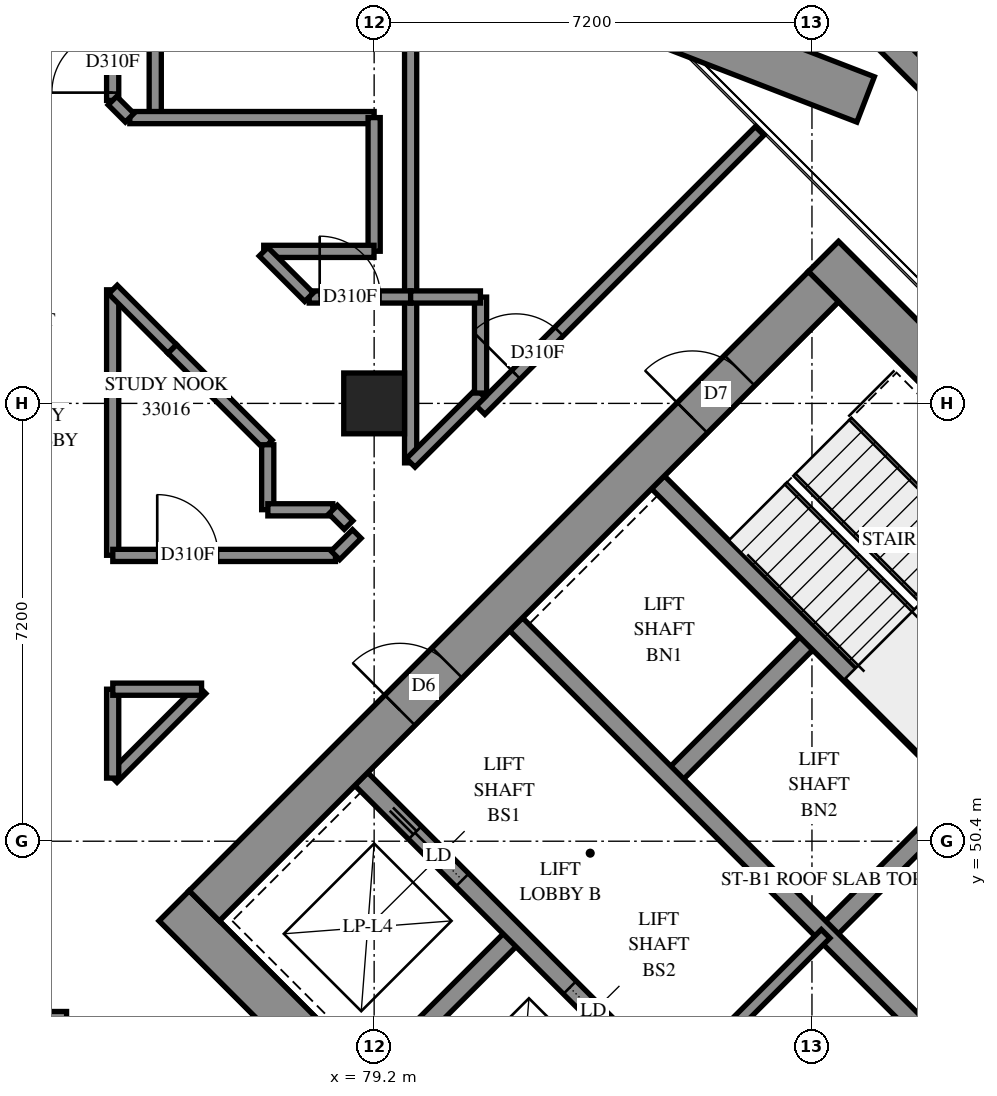
"""IFC4 building model, lengths in metres.
Left out: names, types, materials, properties, quantities, classifications, styles, units other than length and angle.
Written with IfcOpenShell. Run it as: python <this file> out.ifc"""

import sys

from ifc_helpers import new_model, si_unit, direction, frame, frame_2d, origin, origin_2d, place, context, subcontext, project, spatial, polyline, rectangle, outline, extrude, element, fill, save


model = new_model("IFC4")
c1 = context("Model", 3, precision=1e-05, world=origin(), true_north=direction((0.0, 1.0)))
c2 = subcontext(c1, "Body", "Model", "MODEL_VIEW")
j1 = project(units=[si_unit("LENGTHUNIT", "METRE"), si_unit("PLANEANGLEUNIT", "RADIAN")], contexts=[c1])
p1 = place(None, origin())
s1 = spatial("IfcSite", under=j1, at=p1, CompositionType="ELEMENT")
p2 = place(p1, origin())
s2 = spatial("IfcBuilding", under=s1, at=p2, CompositionType="ELEMENT")
p3 = place(p2, frame((0.0, 0.0, 122.0)))
s3 = spatial("IfcBuildingStorey", under=s2, at=p3, CompositionType="ELEMENT", Elevation=122.0)
p4 = place(p3, frame((79.2, 57.6, 0.0), z_axis=(0.0, 0.0, 1.0), x_axis=(1.0, 0.0, 0.0)))
e1 = element("IfcColumn", 1, at=p4, inside=s3, PredefinedType="COLUMN", context=c2, shape_type="SweptSolid", body=[
    extrude(rectangle(XDim=1.0, YDim=1.0, at=origin_2d()), origin(), (0.0, 0.0, 1.0), 3.9),
])
p5 = place(p3, frame((75.912, 49.337, -0.3), z_axis=(0.0, 0.0, 1.0), x_axis=(0.7071036166, -0.7071099457, 0.0)))
e2 = element("IfcWall", 2, at=p5, inside=s3, PredefinedType="SHEAR", context=c2, shape_type="SweptSolid", body=[
    extrude(rectangle(XDim=15.8, YDim=0.7, at=frame_2d((7.9, 0.0))), origin(), (0.0, 0.0, 1.0), 3.5),
])
p6 = place(p3, frame((86.589, 60.014, -0.3), z_axis=(0.0, 0.0, 1.0), x_axis=(0.7071099457, -0.7071036166, 0.0)))
e3 = element("IfcWall", 3, at=p6, inside=s3, PredefinedType="SHEAR", context=c2, shape_type="SweptSolid", body=[
    extrude(rectangle(XDim=15.8, YDim=0.7, at=frame_2d((7.9, 0.0))), origin(), (0.0, 0.0, 1.0), 3.5),
])
p7 = place(p6, frame((10.7, 0.0, 0.3)))
e4 = element("IfcOpeningElement", 4, at=p7, cuts=e3, PredefinedType="OPENING", context=c2, shape_type="SweptSolid", body=[
    extrude(rectangle(XDim=0.8, YDim=2.1, at=frame_2d((0.4, 1.05))), frame((0.0, 0.36, 0.0), z_axis=(0.0, -1.0, 0.0), x_axis=(1.0, 0.0, 0.0)), (0.0, 0.0, 1.0), 0.72),
])
p8 = place(p3, frame((76.407, 49.337, -0.3), z_axis=(0.0, 0.0, 1.0), x_axis=(0.7071067812, 0.7071067812, 0.0)))
e5 = element("IfcWall", 5, at=p8, inside=s3, PredefinedType="SHEAR", context=c2, shape_type="SweptSolid", body=[
    extrude(rectangle(XDim=14.4, YDim=0.7, at=frame_2d((7.2, 0.0))), origin(), (0.0, 0.0, 1.0), 3.5),
])
p9 = place(p8, frame((4.55, 0.0, 0.3)))
e6 = element("IfcOpeningElement", 6, at=p9, cuts=e5, PredefinedType="OPENING", context=c2, shape_type="SweptSolid", body=[
    extrude(rectangle(XDim=1.1, YDim=2.1, at=frame_2d((0.55, 1.05))), frame((0.0, 0.36, 0.0), z_axis=(0.0, -1.0, 0.0), x_axis=(1.0, 0.0, 0.0)), (0.0, 0.0, 1.0), 0.72),
])
p10 = place(p8, frame((11.35, 0.0, 0.3)))
e7 = element("IfcOpeningElement", 7, at=p10, cuts=e5, PredefinedType="OPENING", context=c2, shape_type="SweptSolid", body=[
    extrude(rectangle(XDim=1.1, YDim=2.1, at=frame_2d((0.55, 1.05))), frame((0.0, 0.36, 0.0), z_axis=(0.0, -1.0, 0.0), x_axis=(1.0, 0.0, 0.0)), (0.0, 0.0, 1.0), 0.72),
])
p11 = place(p3, frame((87.084, 38.66, -0.3), z_axis=(0.0, 0.0, 1.0), x_axis=(0.7071067812, 0.7071067812, 0.0)))
e8 = element("IfcWall", 8, at=p11, inside=s3, PredefinedType="SHEAR", context=c2, shape_type="SweptSolid", body=[
    extrude(rectangle(XDim=14.4, YDim=0.7, at=frame_2d((7.2, 0.0))), origin(), (0.0, 0.0, 1.0), 3.5),
])
p12 = place(p11, frame((4.55, 0.0, 0.3)))
e9 = element("IfcOpeningElement", 9, at=p12, cuts=e8, PredefinedType="OPENING", context=c2, shape_type="SweptSolid", body=[
    extrude(rectangle(XDim=1.1, YDim=2.1, at=frame_2d((0.55, 1.05))), frame((0.0, 0.36, 0.0), z_axis=(0.0, -1.0, 0.0), x_axis=(1.0, 0.0, 0.0)), (0.0, 0.0, 1.0), 0.72),
])
p13 = place(p11, frame((11.35, 0.0, 0.3)))
e10 = element("IfcOpeningElement", 10, at=p13, cuts=e8, PredefinedType="OPENING", context=c2, shape_type="SweptSolid", body=[
    extrude(rectangle(XDim=1.1, YDim=2.1, at=frame_2d((0.55, 1.05))), frame((0.0, 0.36, 0.0), z_axis=(0.0, -1.0, 0.0), x_axis=(1.0, 0.0, 0.0)), (0.0, 0.0, 1.0), 0.72),
])
for number, where, z_axis, x_axis in (
    (11, (79.2, 46.544, 0.0), (0.0, 0.0, 1.0), (0.707, 0.707, 0.0)),
    (12, (84.079, 51.423, 0.0), (0.0, 0.0, 1.0), (0.707, 0.707, 0.0)),
):
    element("IfcWall", number, at=place(p3, frame(where, z_axis=z_axis, x_axis=x_axis)), inside=s3, PredefinedType="SOLIDWALL", context=c2, shape_type="SweptSolid", body=[
        extrude(rectangle(XDim=3.3, YDim=0.3, at=frame_2d((1.65, 0.0))), origin(), (0.0, 0.0, 1.0), 3.9),
    ])
p14 = place(p3, frame((86.625, 48.878, 0.0), z_axis=(0.0, 0.0, 1.0), x_axis=(0.7071067812, 0.7071067812, 0.0)))
e13 = element("IfcWall", 13, at=p14, inside=s3, PredefinedType="SOLIDWALL", context=c2, shape_type="SweptSolid", body=[
    extrude(rectangle(XDim=3.3, YDim=0.3, at=frame_2d((1.65, 0.0))), origin(), (0.0, 0.0, 1.0), 3.9),
])
p15 = place(p3, frame((78.988, 51.423, 0.0), z_axis=(0.0, 0.0, 1.0), x_axis=(0.7071067812, -0.7071067812, 0.0)))
e14 = element("IfcWall", 14, at=p15, inside=s3, PredefinedType="SOLIDWALL", context=c2, shape_type="SweptSolid", body=[
    extrude(rectangle(XDim=14.4, YDim=0.3, at=frame_2d((7.2, 0.0))), origin(), (0.0, 0.0, 1.0), 3.9),
])
p16 = place(p15, frame((1.25, 0.0, 0.0)))
e15 = element("IfcOpeningElement", 15, at=p16, cuts=e14, PredefinedType="OPENING", context=c2, shape_type="SweptSolid", body=[
    extrude(rectangle(XDim=1.1, YDim=2.1, at=frame_2d((0.55, 1.05))), frame((0.0, 0.16, 0.0), z_axis=(0.0, -1.0, 0.0), x_axis=(1.0, 0.0, 0.0)), (0.0, 0.0, 1.0), 0.32),
])
p17 = place(p15, frame((4.85, 0.0, 0.0)))
e16 = element("IfcOpeningElement", 16, at=p17, cuts=e14, PredefinedType="OPENING", context=c2, shape_type="SweptSolid", body=[
    extrude(rectangle(XDim=1.1, YDim=2.1, at=frame_2d((0.55, 1.05))), frame((0.0, 0.16, 0.0), z_axis=(0.0, -1.0, 0.0), x_axis=(1.0, 0.0, 0.0)), (0.0, 0.0, 1.0), 0.32),
])
p18 = place(p15, frame((8.45, 0.0, 0.0)))
e17 = element("IfcOpeningElement", 17, at=p18, cuts=e14, PredefinedType="OPENING", context=c2, shape_type="SweptSolid", body=[
    extrude(rectangle(XDim=1.1, YDim=2.1, at=frame_2d((0.55, 1.05))), frame((0.0, 0.16, 0.0), z_axis=(0.0, -1.0, 0.0), x_axis=(1.0, 0.0, 0.0)), (0.0, 0.0, 1.0), 0.32),
])
p19 = place(p15, frame((12.05, 0.0, 0.0)))
e18 = element("IfcOpeningElement", 18, at=p19, cuts=e14, PredefinedType="OPENING", context=c2, shape_type="SweptSolid", body=[
    extrude(rectangle(XDim=1.1, YDim=2.1, at=frame_2d((0.55, 1.05))), frame((0.0, 0.16, 0.0), z_axis=(0.0, -1.0, 0.0), x_axis=(1.0, 0.0, 0.0)), (0.0, 0.0, 1.0), 0.32),
])
p20 = place(p3, frame((81.534, 53.969, 0.0), z_axis=(0.0, 0.0, 1.0), x_axis=(0.707103309, -0.7071102534, 0.0)))
e19 = element("IfcWall", 19, at=p20, inside=s3, PredefinedType="SOLIDWALL", context=c2, shape_type="SweptSolid", body=[
    extrude(rectangle(XDim=14.4, YDim=0.3, at=frame_2d((7.2, 0.0))), origin(), (0.0, 0.0, 1.0), 3.9),
])
p21 = place(p20, frame((12.05, 0.0, 0.0)))
e20 = element("IfcOpeningElement", 20, at=p21, cuts=e19, PredefinedType="OPENING", context=c2, shape_type="SweptSolid", body=[
    extrude(rectangle(XDim=1.1, YDim=2.1, at=frame_2d((0.55, 1.05))), frame((0.0, 0.16, 0.0), z_axis=(0.0, -1.0, 0.0), x_axis=(1.0, 0.0, 0.0)), (0.0, 0.0, 1.0), 0.32),
])
p22 = place(p3, frame((83.867, 56.302, 0.0), z_axis=(0.0, 0.0, 1.0), x_axis=(0.7071137256, -0.7070998367, 0.0)))
e21 = element("IfcWall", 21, at=p22, inside=s3, PredefinedType="SOLIDWALL", context=c2, shape_type="SweptSolid", body=[
    extrude(rectangle(XDim=7.2, YDim=0.3, at=frame_2d((3.6, 0.0))), origin(), (0.0, 0.0, 1.0), 3.9),
])
p23 = place(p3, frame((87.282, 62.599, 0.0), z_axis=(0.0, 0.0, 1.0), x_axis=(-0.9328056398, 0.360379853, 0.0)))
e22 = element("IfcWall", 22, at=p23, inside=s3, PredefinedType="SOLIDWALL", context=c2, shape_type="SweptSolid", body=[
    extrude(rectangle(XDim=6.413, YDim=0.8, at=frame_2d((3.207, 0.0))), origin(), (0.0, 0.0, 1.0), 0.65),
])
p24 = place(p3, frame((107.838, 44.847, 0.0), z_axis=(0.0, 0.0, 1.0), x_axis=(-0.7071067812, 0.7071067812, 0.0)))
e23 = element("IfcWall", 23, at=p24, inside=s3, PredefinedType="SOLIDWALL", context=c2, shape_type="SweptSolid", body=[
    extrude(outline(polyline([(-0.1, -0.1), (39.926, -0.1), (39.843, 0.1), (0.1, 0.1), (-0.1, -0.1)])), origin(), (0.0, 0.0, 1.0), 4.2),
])
p25 = place(p3, frame((84.079, 46.332, 0.0), z_axis=(0.0, 0.0, 1.0), x_axis=(0.7071067812, 0.7071067812, 0.0)))
e24 = element("IfcWall", 24, at=p25, inside=s3, PredefinedType="PARTITIONING", context=c2, shape_type="SweptSolid", body=[
    extrude(rectangle(XDim=3.6, YDim=0.2, at=frame_2d((1.8, 0.0))), origin(), (0.0, 0.0, 1.0), 3.9),
])
p26 = place(p3, frame((54.7, 47.5, 0.0), z_axis=(0.0, 0.0, 1.0), x_axis=(1.0, 0.0, 0.0)))
e25 = element("IfcWall", 25, at=p26, inside=s3, PredefinedType="PARTITIONING", context=c2, shape_type="SweptSolid", body=[
    extrude(rectangle(XDim=19.442, YDim=0.2, at=frame_2d((9.721, 0.0))), origin(), (0.0, 0.0, 1.0), 3.9),
])
p27 = place(p26, frame((12.444, 0.0, 0.0)))
e26 = element("IfcOpeningElement", 26, at=p27, cuts=e25, PredefinedType="OPENING", context=c2, shape_type="SweptSolid", body=[
    extrude(rectangle(XDim=1.0, YDim=2.1, at=frame_2d((0.5, 1.05))), frame((0.0, 0.11, 0.0), z_axis=(0.0, -1.0, 0.0), x_axis=(1.0, 0.0, 0.0)), (0.0, 0.0, 1.0), 0.22),
])
p28 = place(p3, frame((79.8, 59.35, 0.0), z_axis=(0.0, 0.0, 1.0), x_axis=(0.0, 1.0, 0.0)))
e27 = element("IfcWall", 27, at=p28, inside=s3, PredefinedType="PARTITIONING", context=c2, shape_type="SweptSolid", body=[
    extrude(rectangle(XDim=8.472, YDim=0.2, at=frame_2d((4.236, 0.0))), origin(), (0.0, 0.0, 1.0), 3.9),
])
p29 = place(p3, frame((75.6, 62.3, 0.0), z_axis=(0.0, 0.0, 1.0), x_axis=(0.0, 1.0, 0.0)))
e28 = element("IfcWall", 28, at=p29, inside=s3, PredefinedType="PARTITIONING", context=c2, shape_type="SweptSolid", body=[
    extrude(rectangle(XDim=7.17, YDim=0.2, at=frame_2d((3.585, 0.0))), origin(), (0.0, 0.0, 1.0), 3.9),
])
p30 = place(p3, frame((80.95, 57.49, 0.0), z_axis=(0.0, 0.0, 1.0), x_axis=(0.7069527442, 0.7072607846, 0.0)))
e29 = element("IfcWall", 29, at=p30, inside=s3, PredefinedType="PARTITIONING", context=c2, shape_type="SweptSolid", body=[
    extrude(rectangle(XDim=6.493, YDim=0.2, at=frame_2d((3.246, 0.0))), origin(), (0.0, 0.0, 1.0), 3.9),
])
p31 = place(p30, frame((0.824, 0.0, 0.0)))
e30 = element("IfcOpeningElement", 30, at=p31, cuts=e29, PredefinedType="OPENING", context=c2, shape_type="SweptSolid", body=[
    extrude(rectangle(XDim=1.0, YDim=2.1, at=frame_2d((0.5, 1.05))), frame((0.0, 0.11, 0.0), z_axis=(0.0, -1.0, 0.0), x_axis=(1.0, 0.0, 0.0)), (0.0, 0.0, 1.0), 0.22),
])
p32 = place(p3, frame((74.9, 62.582, 0.0), z_axis=(0.0, 0.0, 1.0), x_axis=(0.0, 1.0, 0.0)))
e31 = element("IfcWall", 31, at=p32, inside=s3, PredefinedType="PARTITIONING", context=c2, shape_type="SweptSolid", body=[
    extrude(rectangle(XDim=5.118, YDim=0.2, at=frame_2d((2.559, 0.0))), origin(), (0.0, 0.0, 1.0), 3.9),
])
p33 = place(p32, frame((0.129, 0.0, 0.0)))
e32 = element("IfcOpeningElement", 32, at=p33, cuts=e31, PredefinedType="OPENING", context=c2, shape_type="SweptSolid", body=[
    extrude(rectangle(XDim=1.0, YDim=2.1, at=frame_2d((0.5, 1.05))), frame((0.0, 0.11, 0.0), z_axis=(0.0, -1.0, 0.0), x_axis=(1.0, 0.0, 0.0)), (0.0, 0.0, 1.0), 0.22),
])
p34 = place(p3, frame((74.9, 55.102, 0.0), z_axis=(0.0, 0.0, 1.0), x_axis=(0.0, 1.0, 0.0)))
e33 = element("IfcWall", 33, at=p34, inside=s3, PredefinedType="PARTITIONING", context=c2, shape_type="SweptSolid", body=[
    extrude(rectangle(XDim=4.366, YDim=0.2, at=frame_2d((2.183, 0.0))), origin(), (0.0, 0.0, 1.0), 3.9),
])
p35 = place(p3, frame((75.182, 62.3, 0.0), z_axis=(0.0, 0.0, 1.0), x_axis=(1.0, 0.0, 0.0)))
e34 = element("IfcWall", 34, at=p35, inside=s3, PredefinedType="PARTITIONING", context=c2, shape_type="SweptSolid", body=[
    extrude(rectangle(XDim=4.018, YDim=0.2, at=frame_2d((2.009, 0.0))), origin(), (0.0, 0.0, 1.0), 3.9),
])
p36 = place(p3, frame((74.902, 55.1, 0.0), z_axis=(0.0, 0.0, 1.0), x_axis=(1.0, 0.0, 0.0)))
e35 = element("IfcWall", 35, at=p36, inside=s3, PredefinedType="PARTITIONING", context=c2, shape_type="SweptSolid", body=[
    extrude(rectangle(XDim=3.662, YDim=0.2, at=frame_2d((1.831, 0.0))), origin(), (0.0, 0.0, 1.0), 3.9),
])
p37 = place(p36, frame((0.731, 0.0, 0.0)))
e36 = element("IfcOpeningElement", 36, at=p37, cuts=e35, PredefinedType="OPENING", context=c2, shape_type="SweptSolid", body=[
    extrude(rectangle(XDim=1.0, YDim=2.1, at=frame_2d((0.5, 1.05))), frame((0.0, 0.11, 0.0), z_axis=(0.0, -1.0, 0.0), x_axis=(1.0, 0.0, 0.0)), (0.0, 0.0, 1.0), 0.22),
])
p38 = place(p3, frame((79.8, 56.622, 0.0), z_axis=(0.0, 0.0, 1.0), x_axis=(0.0, 1.0, 0.0)))
e37 = element("IfcWall", 37, at=p38, inside=s3, PredefinedType="PARTITIONING", context=c2, shape_type="SweptSolid", body=[
    extrude(rectangle(XDim=2.728, YDim=0.2, at=frame_2d((1.364, 0.0))), origin(), (0.0, 0.0, 1.0), 3.9),
])
p39 = place(p3, frame((75.879, 58.497, 0.0), z_axis=(0.0, 0.0, 1.0), x_axis=(0.7075561657, -0.7066571109, 0.0)))
e38 = element("IfcWall", 38, at=p39, inside=s3, PredefinedType="PARTITIONING", context=c2, shape_type="SweptSolid", body=[
    extrude(rectangle(XDim=2.225, YDim=0.2, at=frame_2d((1.112, 0.0))), origin(), (0.0, 0.0, 1.0), 3.9),
])
p40 = place(p3, frame((79.2, 60.102, 0.0), z_axis=(0.0, 0.0, 1.0), x_axis=(0.0, 1.0, 0.0)))
e39 = element("IfcWall", 39, at=p40, inside=s3, PredefinedType="PARTITIONING", context=c2, shape_type="SweptSolid", body=[
    extrude(rectangle(XDim=2.198, YDim=0.2, at=frame_2d((1.099, 0.0))), origin(), (0.0, 0.0, 1.0), 3.9),
])
p41 = place(p3, frame((74.901, 51.439, 0.0), z_axis=(0.0, 0.0, 1.0), x_axis=(0.7071067812, 0.7071067812, 0.0)))
e40 = element("IfcWall", 40, at=p41, inside=s3, PredefinedType="PARTITIONING", context=c2, shape_type="SweptSolid", body=[
    extrude(rectangle(XDim=2.065, YDim=0.2, at=frame_2d((1.032, 0.0))), origin(), (0.0, 0.0, 1.0), 3.9),
])
p42 = place(p3, frame((77.384, 60.1, 0.0), z_axis=(0.0, 0.0, 1.0), x_axis=(1.0, 0.0, 0.0)))
e41 = element("IfcWall", 41, at=p42, inside=s3, PredefinedType="PARTITIONING", context=c2, shape_type="SweptSolid", body=[
    extrude(rectangle(XDim=1.814, YDim=0.2, at=frame_2d((0.907, 0.0))), origin(), (0.0, 0.0, 1.0), 3.9),
])
p43 = place(p3, frame((78.132, 59.35, 0.0), z_axis=(0.0, 0.0, 1.0), x_axis=(1.0, 0.0, 0.0)))
e42 = element("IfcWall", 42, at=p43, inside=s3, PredefinedType="PARTITIONING", context=c2, shape_type="SweptSolid", body=[
    extrude(rectangle(XDim=1.668, YDim=0.2, at=frame_2d((0.834, 0.0))), origin(), (0.0, 0.0, 1.0), 3.9),
])
p44 = place(p43, frame((0.172, 0.0, 0.0)))
e43 = element("IfcOpeningElement", 43, at=p44, cuts=e42, PredefinedType="OPENING", context=c2, shape_type="SweptSolid", body=[
    extrude(rectangle(XDim=1.0, YDim=2.1, at=frame_2d((0.5, 1.05))), frame((0.0, 0.11, 0.0), z_axis=(0.0, -1.0, 0.0), x_axis=(1.0, 0.0, 0.0)), (0.0, 0.0, 1.0), 0.22),
])
p45 = place(p3, frame((79.802, 56.623, 0.0), z_axis=(0.0, 0.0, 1.0), x_axis=(0.7071067812, 0.7071067812, 0.0)))
e44 = element("IfcWall", 44, at=p45, inside=s3, PredefinedType="PARTITIONING", context=c2, shape_type="SweptSolid", body=[
    extrude(rectangle(XDim=1.623, YDim=0.2, at=frame_2d((0.812, 0.0))), origin(), (0.0, 0.0, 1.0), 3.9),
])
p46 = place(p3, frame((80.95, 57.77, 0.0), z_axis=(0.0, 0.0, 1.0), x_axis=(0.0, 1.0, 0.0)))
e45 = element("IfcWall", 45, at=p46, inside=s3, PredefinedType="PARTITIONING", context=c2, shape_type="SweptSolid", body=[
    extrude(rectangle(XDim=1.578, YDim=0.2, at=frame_2d((0.789, 0.0))), origin(), (0.0, 0.0, 1.0), 3.9),
])
p47 = place(p3, frame((74.9, 51.438, 0.0), z_axis=(0.0, 0.0, 1.0), x_axis=(0.0, 1.0, 0.0)))
e46 = element("IfcWall", 46, at=p47, inside=s3, PredefinedType="PARTITIONING", context=c2, shape_type="SweptSolid", body=[
    extrude(rectangle(XDim=1.462, YDim=0.2, at=frame_2d((0.731, 0.0))), origin(), (0.0, 0.0, 1.0), 3.9),
])
p48 = place(p3, frame((74.902, 52.9, 0.0), z_axis=(0.0, 0.0, 1.0), x_axis=(1.0, 0.0, 0.0)))
e47 = element("IfcWall", 47, at=p48, inside=s3, PredefinedType="PARTITIONING", context=c2, shape_type="SweptSolid", body=[
    extrude(rectangle(XDim=1.46, YDim=0.2, at=frame_2d((0.73, 0.0))), origin(), (0.0, 0.0, 1.0), 3.9),
])
p49 = place(p3, frame((74.904, 59.472, 0.0), z_axis=(0.0, 0.0, 1.0), x_axis=(0.7063811719, -0.7078316466, 0.0)))
e48 = element("IfcWall", 48, at=p49, inside=s3, PredefinedType="PARTITIONING", context=c2, shape_type="SweptSolid", body=[
    extrude(rectangle(XDim=1.379, YDim=0.2, at=frame_2d((0.69, 0.0))), origin(), (0.0, 0.0, 1.0), 3.9),
])
p50 = place(p3, frame((79.8, 59.35, 0.0), z_axis=(0.0, 0.0, 1.0), x_axis=(1.0, 0.0, 0.0)))
e49 = element("IfcWall", 49, at=p50, inside=s3, PredefinedType="PARTITIONING", context=c2, shape_type="SweptSolid", body=[
    extrude(rectangle(XDim=1.148, YDim=0.2, at=frame_2d((0.574, 0.0))), origin(), (0.0, 0.0, 1.0), 3.9),
])
for number, where, z_axis, x_axis in (
    (50, (77.45, 55.852, 0.0), (0.0, 0.0, 1.0), (0.0, 1.0, 0.0)),
    (51, (77.452, 55.85, 0.0), (0.0, 0.0, 1.0), (1.0, 0.0, 0.0)),
):
    element("IfcWall", number, at=place(p3, frame(where, z_axis=z_axis, x_axis=x_axis)), inside=s3, PredefinedType="PARTITIONING", context=c2, shape_type="SweptSolid", body=[
        extrude(rectangle(XDim=1.068, YDim=0.2, at=frame_2d((0.534, 0.0))), origin(), (0.0, 0.0, 1.0), 3.9),
    ])
p51 = place(p3, frame((77.381, 60.095, 0.0), z_axis=(0.0, 0.0, 1.0), x_axis=(0.7071067812, -0.7071067812, 0.0)))
e52 = element("IfcWall", 52, at=p51, inside=s3, PredefinedType="PARTITIONING", context=c2, shape_type="SweptSolid", body=[
    extrude(rectangle(XDim=1.058, YDim=0.2, at=frame_2d((0.529, 0.0))), origin(), (0.0, 0.0, 1.0), 3.9),
])
p52 = place(p3, frame((78.563, 55.101, 0.0), z_axis=(0.0, 0.0, 1.0), x_axis=(0.7071067812, 0.7071067812, 0.0)))
e53 = element("IfcWall", 53, at=p52, inside=s3, PredefinedType="PARTITIONING", context=c2, shape_type="SweptSolid", body=[
    extrude(rectangle(XDim=0.498, YDim=0.2, at=frame_2d((0.249, 0.0))), origin(), (0.0, 0.0, 1.0), 3.9),
])
p53 = place(p3, frame((74.897, 62.579, 0.0), z_axis=(0.0, 0.0, 1.0), x_axis=(0.7071067812, -0.7071067812, 0.0)))
e54 = element("IfcWall", 54, at=p53, inside=s3, PredefinedType="PARTITIONING", context=c2, shape_type="SweptSolid", body=[
    extrude(rectangle(XDim=0.399, YDim=0.2, at=frame_2d((0.199, 0.0))), origin(), (0.0, 0.0, 1.0), 3.9),
])
p54 = place(p3, frame((78.525, 55.853, 0.0), z_axis=(0.0, 0.0, 1.0), x_axis=(0.7071067812, -0.7071067812, 0.0)))
e55 = element("IfcWall", 55, at=p54, inside=s3, PredefinedType="PARTITIONING", context=c2, shape_type="SweptSolid", body=[
    extrude(rectangle(XDim=0.359, YDim=0.2, at=frame_2d((0.18, 0.0))), origin(), (0.0, 0.0, 1.0), 3.9),
])
p55 = place(p9, origin())
e56 = element("IfcDoor", 56, at=p55, inside=s3, OperationType="DOUBLE_DOOR_SINGLE_SWING", PredefinedType="DOOR", context=c2, shape_type="SweptSolid", body=[
    extrude(rectangle(XDim=1.1, YDim=2.1, at=frame_2d((0.55, 1.05))), frame((0.0, 0.025, 0.0), z_axis=(0.0, -1.0, 0.0), x_axis=(1.0, 0.0, 0.0)), (0.0, 0.0, 1.0), 0.05),
])
fill(e6, e56)
p56 = place(p10, origin())
e57 = element("IfcDoor", 57, at=p56, inside=s3, OperationType="SINGLE_SWING_LEFT", PredefinedType="DOOR", context=c2, shape_type="SweptSolid", body=[
    extrude(rectangle(XDim=1.1, YDim=2.1, at=frame_2d((0.55, 1.05))), frame((0.0, 0.025, 0.0), z_axis=(0.0, -1.0, 0.0), x_axis=(1.0, 0.0, 0.0)), (0.0, 0.0, 1.0), 0.05),
])
fill(e7, e57)
p57 = place(p16, origin())
e58 = element("IfcDoor", 58, at=p57, inside=s3, OperationType="SLIDING_TO_LEFT", PredefinedType="DOOR", context=c2, shape_type="SweptSolid", body=[
    extrude(rectangle(XDim=1.1, YDim=2.1, at=frame_2d((0.55, 1.05))), frame((0.0, 0.025, 0.0), z_axis=(0.0, -1.0, 0.0), x_axis=(1.0, 0.0, 0.0)), (0.0, 0.0, 1.0), 0.05),
])
fill(e15, e58)
p58 = place(p17, origin())
e59 = element("IfcDoor", 59, at=p58, inside=s3, OperationType="SLIDING_TO_RIGHT", PredefinedType="DOOR", context=c2, shape_type="SweptSolid", body=[
    extrude(rectangle(XDim=1.1, YDim=2.1, at=frame_2d((0.55, 1.05))), frame((0.0, 0.025, 0.0), z_axis=(0.0, -1.0, 0.0), x_axis=(1.0, 0.0, 0.0)), (0.0, 0.0, 1.0), 0.05),
])
fill(e16, e59)
p59 = place(p37, origin())
e60 = element("IfcDoor", 60, at=p59, inside=s3, OperationType="SINGLE_SWING_LEFT", PredefinedType="DOOR", context=c2, shape_type="SweptSolid", body=[
    extrude(rectangle(XDim=1.0, YDim=2.1, at=frame_2d((0.5, 1.05))), frame((0.0, 0.025, 0.0), z_axis=(0.0, -1.0, 0.0), x_axis=(1.0, 0.0, 0.0)), (0.0, 0.0, 1.0), 0.05),
])
fill(e36, e60)
p60 = place(p33, origin())
e61 = element("IfcDoor", 61, at=p60, inside=s3, OperationType="SINGLE_SWING_LEFT", PredefinedType="DOOR", context=c2, shape_type="SweptSolid", body=[
    extrude(rectangle(XDim=1.0, YDim=2.1, at=frame_2d((0.5, 1.05))), frame((0.0, 0.025, 0.0), z_axis=(0.0, -1.0, 0.0), x_axis=(1.0, 0.0, 0.0)), (0.0, 0.0, 1.0), 0.05),
])
fill(e32, e61)
p61 = place(p44, origin())
e62 = element("IfcDoor", 62, at=p61, inside=s3, OperationType="SINGLE_SWING_LEFT", PredefinedType="DOOR", context=c2, shape_type="SweptSolid", body=[
    extrude(rectangle(XDim=1.0, YDim=2.1, at=frame_2d((0.5, 1.05))), frame((0.0, 0.025, 0.0), z_axis=(0.0, -1.0, 0.0), x_axis=(1.0, 0.0, 0.0)), (0.0, 0.0, 1.0), 0.05),
])
fill(e43, e62)
p62 = place(p31, origin())
e63 = element("IfcDoor", 63, at=p62, inside=s3, OperationType="SINGLE_SWING_RIGHT", PredefinedType="DOOR", context=c2, shape_type="SweptSolid", body=[
    extrude(rectangle(XDim=1.0, YDim=2.1, at=frame_2d((0.5, 1.05))), frame((0.0, 0.025, 0.0), z_axis=(0.0, -1.0, 0.0), x_axis=(1.0, 0.0, 0.0)), (0.0, 0.0, 1.0), 0.05),
])
fill(e30, e63)
save(model, sys.argv[1])
